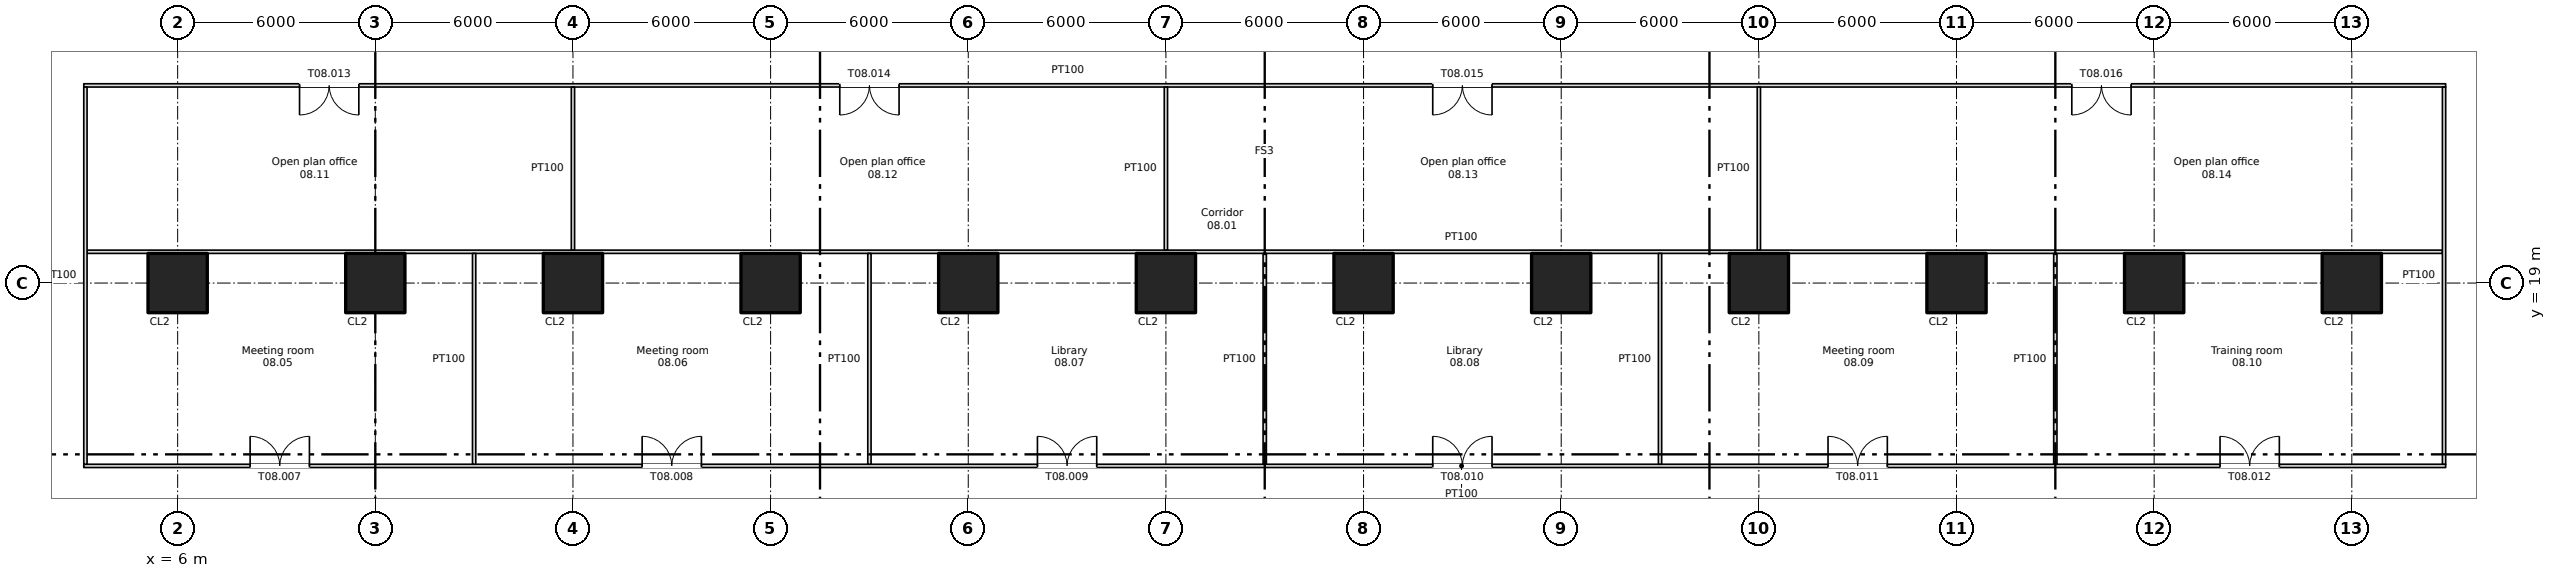
"""IFC4 building model, lengths in metres.
Left out: names, types, materials, properties, quantities, classifications, styles, units other than length and angle.
Written with IfcOpenShell. Run it as: python <this file> out.ifc"""

import sys

from ifc_helpers import new_model, si_unit, direction, frame, frame_2d, origin, origin_2d, place, context, subcontext, project, spatial, rectangle, extrude, element, fill, save


model = new_model("IFC4")
c1 = context("Model", 3, precision=1e-05, world=origin(), true_north=direction((0.0, 1.0)))
c2 = subcontext(c1, "Body", "Model", "MODEL_VIEW")
j1 = project(units=[si_unit("LENGTHUNIT", "METRE"), si_unit("PLANEANGLEUNIT", "RADIAN")], contexts=[c1])
p1 = place(None, origin())
s1 = spatial("IfcSite", under=j1, at=p1, CompositionType="ELEMENT")
p2 = place(p1, origin())
s2 = spatial("IfcBuilding", under=s1, at=p2, CompositionType="ELEMENT")
p3 = place(p2, frame((0.0, 0.0, 30.0)))
s3 = spatial("IfcBuildingStorey", under=s2, at=p3, CompositionType="ELEMENT", Elevation=30.0)
for number, where, z_axis, x_axis in (
    (1, (6.0, 19.0, 0.0), (0.0, 0.0, 1.0), (1.0, 0.0, 0.0)),
    (2, (12.0, 19.0, 0.0), (0.0, 0.0, 1.0), (1.0, 0.0, 0.0)),
    (3, (18.0, 19.0, 0.0), (0.0, 0.0, 1.0), (1.0, 0.0, 0.0)),
    (4, (24.0, 19.0, 0.0), (0.0, 0.0, 1.0), (1.0, 0.0, 0.0)),
    (5, (30.0, 19.0, 0.0), (0.0, 0.0, 1.0), (1.0, 0.0, 0.0)),
    (6, (36.0, 19.0, 0.0), (0.0, 0.0, 1.0), (1.0, 0.0, 0.0)),
    (7, (42.0, 19.0, 0.0), (0.0, 0.0, 1.0), (1.0, 0.0, 0.0)),
    (8, (48.0, 19.0, 0.0), (0.0, 0.0, 1.0), (1.0, 0.0, 0.0)),
    (9, (54.0, 19.0, 0.0), (0.0, 0.0, 1.0), (1.0, 0.0, 0.0)),
    (10, (60.0, 19.0, 0.0), (0.0, 0.0, 1.0), (1.0, 0.0, 0.0)),
    (11, (66.0, 19.0, 0.0), (0.0, 0.0, 1.0), (1.0, 0.0, 0.0)),
    (12, (72.0, 19.0, 0.0), (0.0, 0.0, 1.0), (1.0, 0.0, 0.0)),
):
    element("IfcColumn", number, at=place(p3, frame(where, z_axis=z_axis, x_axis=x_axis)), inside=s3, PredefinedType="COLUMN", context=c2, shape_type="SweptSolid", body=[
        extrude(rectangle(XDim=1.8, YDim=1.8, at=origin_2d()), origin(), (0.0, 0.0, 1.0), 3.35),
    ])
p4 = place(p3, frame((3.15, 13.45, 0.0), z_axis=(0.0, 0.0, 1.0), x_axis=(1.0, 0.0, 0.0)))
e13 = element("IfcWall", 13, at=p4, inside=s3, PredefinedType="PARTITIONING", context=c2, shape_type="SweptSolid", body=[
    extrude(rectangle(XDim=71.7, YDim=0.1, at=frame_2d((35.85, 0.0))), origin(), (0.0, 0.0, 1.0), 3.35),
])
p5 = place(p4, frame((5.05, 0.0, 0.0)))
e14 = element("IfcOpeningElement", 14, at=p5, cuts=e13, PredefinedType="OPENING", context=c2, shape_type="SweptSolid", body=[
    extrude(rectangle(XDim=1.8, YDim=2.1, at=frame_2d((0.9, 1.05))), frame((0.0, 0.06, 0.0), z_axis=(0.0, -1.0, 0.0), x_axis=(1.0, 0.0, 0.0)), (0.0, 0.0, 1.0), 0.12),
])
p6 = place(p4, frame((16.95, 0.0, 0.0)))
e15 = element("IfcOpeningElement", 15, at=p6, cuts=e13, PredefinedType="OPENING", context=c2, shape_type="SweptSolid", body=[
    extrude(rectangle(XDim=1.8, YDim=2.1, at=frame_2d((0.9, 1.05))), frame((0.0, 0.06, 0.0), z_axis=(0.0, -1.0, 0.0), x_axis=(1.0, 0.0, 0.0)), (0.0, 0.0, 1.0), 0.12),
])
p7 = place(p4, frame((28.95, 0.0, 0.0)))
e16 = element("IfcOpeningElement", 16, at=p7, cuts=e13, PredefinedType="OPENING", context=c2, shape_type="SweptSolid", body=[
    extrude(rectangle(XDim=1.8, YDim=2.1, at=frame_2d((0.9, 1.05))), frame((0.0, 0.06, 0.0), z_axis=(0.0, -1.0, 0.0), x_axis=(1.0, 0.0, 0.0)), (0.0, 0.0, 1.0), 0.12),
])
p8 = place(p4, frame((40.95, 0.0, 0.0)))
e17 = element("IfcOpeningElement", 17, at=p8, cuts=e13, PredefinedType="OPENING", context=c2, shape_type="SweptSolid", body=[
    extrude(rectangle(XDim=1.8, YDim=2.1, at=frame_2d((0.9, 1.05))), frame((0.0, 0.06, 0.0), z_axis=(0.0, -1.0, 0.0), x_axis=(1.0, 0.0, 0.0)), (0.0, 0.0, 1.0), 0.12),
])
p9 = place(p4, frame((52.95, 0.0, 0.0)))
e18 = element("IfcOpeningElement", 18, at=p9, cuts=e13, PredefinedType="OPENING", context=c2, shape_type="SweptSolid", body=[
    extrude(rectangle(XDim=1.8, YDim=2.1, at=frame_2d((0.9, 1.05))), frame((0.0, 0.06, 0.0), z_axis=(0.0, -1.0, 0.0), x_axis=(1.0, 0.0, 0.0)), (0.0, 0.0, 1.0), 0.12),
])
p10 = place(p4, frame((64.85, 0.0, 0.0)))
e19 = element("IfcOpeningElement", 19, at=p10, cuts=e13, PredefinedType="OPENING", context=c2, shape_type="SweptSolid", body=[
    extrude(rectangle(XDim=1.8, YDim=2.1, at=frame_2d((0.9, 1.05))), frame((0.0, 0.06, 0.0), z_axis=(0.0, -1.0, 0.0), x_axis=(1.0, 0.0, 0.0)), (0.0, 0.0, 1.0), 0.12),
])
p11 = place(p3, frame((3.25, 19.95, 0.0), z_axis=(0.0, 0.0, 1.0), x_axis=(1.0, 0.0, 0.0)))
e20 = element("IfcWall", 20, at=p11, inside=s3, PredefinedType="PARTITIONING", context=c2, shape_type="SweptSolid", body=[
    extrude(rectangle(XDim=71.5, YDim=0.1, at=frame_2d((35.75, 0.0))), origin(), (0.0, 0.0, 1.0), 3.35),
])
p12 = place(p3, frame((3.15, 25.0, 0.0), z_axis=(0.0, 0.0, 1.0), x_axis=(1.0, 0.0, 0.0)))
e21 = element("IfcWall", 21, at=p12, inside=s3, PredefinedType="PARTITIONING", context=c2, shape_type="SweptSolid", body=[
    extrude(rectangle(XDim=71.7, YDim=0.1, at=frame_2d((35.85, 0.0))), origin(), (0.0, 0.0, 1.0), 3.35),
])
p13 = place(p12, frame((6.55, 0.0, 0.0)))
e22 = element("IfcOpeningElement", 22, at=p13, cuts=e21, PredefinedType="OPENING", context=c2, shape_type="SweptSolid", body=[
    extrude(rectangle(XDim=1.8, YDim=2.1, at=frame_2d((0.9, 1.05))), frame((0.0, 0.06, 0.0), z_axis=(0.0, -1.0, 0.0), x_axis=(1.0, 0.0, 0.0)), (0.0, 0.0, 1.0), 0.12),
])
p14 = place(p12, frame((22.95, 0.0, 0.0)))
e23 = element("IfcOpeningElement", 23, at=p14, cuts=e21, PredefinedType="OPENING", context=c2, shape_type="SweptSolid", body=[
    extrude(rectangle(XDim=1.8, YDim=2.1, at=frame_2d((0.9, 1.05))), frame((0.0, 0.06, 0.0), z_axis=(0.0, -1.0, 0.0), x_axis=(1.0, 0.0, 0.0)), (0.0, 0.0, 1.0), 0.12),
])
p15 = place(p12, frame((40.95, 0.0, 0.0)))
e24 = element("IfcOpeningElement", 24, at=p15, cuts=e21, PredefinedType="OPENING", context=c2, shape_type="SweptSolid", body=[
    extrude(rectangle(XDim=1.8, YDim=2.1, at=frame_2d((0.9, 1.05))), frame((0.0, 0.06, 0.0), z_axis=(0.0, -1.0, 0.0), x_axis=(1.0, 0.0, 0.0)), (0.0, 0.0, 1.0), 0.12),
])
p16 = place(p12, frame((60.35, 0.0, 0.0)))
e25 = element("IfcOpeningElement", 25, at=p16, cuts=e21, PredefinedType="OPENING", context=c2, shape_type="SweptSolid", body=[
    extrude(rectangle(XDim=1.8, YDim=2.1, at=frame_2d((0.9, 1.05))), frame((0.0, 0.06, 0.0), z_axis=(0.0, -1.0, 0.0), x_axis=(1.0, 0.0, 0.0)), (0.0, 0.0, 1.0), 0.12),
])
p17 = place(p3, frame((3.2, 13.5, 0.0), z_axis=(0.0, 0.0, 1.0), x_axis=(0.0, 1.0, 0.0)))
e26 = element("IfcWall", 26, at=p17, inside=s3, PredefinedType="PARTITIONING", context=c2, shape_type="SweptSolid", body=[
    extrude(rectangle(XDim=11.45, YDim=0.1, at=frame_2d((5.725, 0.0))), origin(), (0.0, 0.0, 1.0), 3.35),
])
p18 = place(p3, frame((15.0, 13.5, 0.0), z_axis=(0.0, 0.0, 1.0), x_axis=(0.0, 1.0, 0.0)))
e27 = element("IfcWall", 27, at=p18, inside=s3, PredefinedType="PARTITIONING", context=c2, shape_type="SweptSolid", body=[
    extrude(rectangle(XDim=6.4, YDim=0.1, at=frame_2d((3.2, 0.0))), origin(), (0.0, 0.0, 1.0), 3.35),
])
p19 = place(p3, frame((18.0, 20.0, 0.0), z_axis=(0.0, 0.0, 1.0), x_axis=(0.0, 1.0, 0.0)))
e28 = element("IfcWall", 28, at=p19, inside=s3, PredefinedType="PARTITIONING", context=c2, shape_type="SweptSolid", body=[
    extrude(rectangle(XDim=4.95, YDim=0.1, at=frame_2d((2.475, 0.0))), origin(), (0.0, 0.0, 1.0), 3.35),
])
p20 = place(p3, frame((27.0, 13.5, 0.0), z_axis=(0.0, 0.0, 1.0), x_axis=(0.0, 1.0, 0.0)))
e29 = element("IfcWall", 29, at=p20, inside=s3, PredefinedType="PARTITIONING", context=c2, shape_type="SweptSolid", body=[
    extrude(rectangle(XDim=6.4, YDim=0.1, at=frame_2d((3.2, 0.0))), origin(), (0.0, 0.0, 1.0), 3.35),
])
p21 = place(p3, frame((36.0, 20.0, 0.0), z_axis=(0.0, 0.0, 1.0), x_axis=(0.0, 1.0, 0.0)))
e30 = element("IfcWall", 30, at=p21, inside=s3, PredefinedType="PARTITIONING", context=c2, shape_type="SweptSolid", body=[
    extrude(rectangle(XDim=4.95, YDim=0.1, at=frame_2d((2.475, 0.0))), origin(), (0.0, 0.0, 1.0), 3.35),
])
for number, where, z_axis, x_axis in (
    (31, (39.0, 13.5, 0.0), (0.0, 0.0, 1.0), (0.0, 1.0, 0.0)),
    (32, (51.0, 13.5, 0.0), (0.0, 0.0, 1.0), (0.0, 1.0, 0.0)),
):
    element("IfcWall", number, at=place(p3, frame(where, z_axis=z_axis, x_axis=x_axis)), inside=s3, PredefinedType="PARTITIONING", context=c2, shape_type="SweptSolid", body=[
        extrude(rectangle(XDim=6.4, YDim=0.1, at=frame_2d((3.2, 0.0))), origin(), (0.0, 0.0, 1.0), 3.35),
    ])
p22 = place(p3, frame((54.0, 20.0, 0.0), z_axis=(0.0, 0.0, 1.0), x_axis=(0.0, 1.0, 0.0)))
e33 = element("IfcWall", 33, at=p22, inside=s3, PredefinedType="PARTITIONING", context=c2, shape_type="SweptSolid", body=[
    extrude(rectangle(XDim=4.95, YDim=0.1, at=frame_2d((2.475, 0.0))), origin(), (0.0, 0.0, 1.0), 3.35),
])
p23 = place(p3, frame((63.0, 13.5, 0.0), z_axis=(0.0, 0.0, 1.0), x_axis=(0.0, 1.0, 0.0)))
e34 = element("IfcWall", 34, at=p23, inside=s3, PredefinedType="PARTITIONING", context=c2, shape_type="SweptSolid", body=[
    extrude(rectangle(XDim=6.4, YDim=0.1, at=frame_2d((3.2, 0.0))), origin(), (0.0, 0.0, 1.0), 3.35),
])
p24 = place(p3, frame((74.8, 13.5, 0.0), z_axis=(0.0, 0.0, 1.0), x_axis=(0.0, 1.0, 0.0)))
e35 = element("IfcWall", 35, at=p24, inside=s3, PredefinedType="PARTITIONING", context=c2, shape_type="SweptSolid", body=[
    extrude(rectangle(XDim=11.45, YDim=0.1, at=frame_2d((5.725, 0.0))), origin(), (0.0, 0.0, 1.0), 3.35),
])
p25 = place(p5, origin())
e36 = element("IfcDoor", 36, at=p25, inside=s3, OperationType="DOUBLE_DOOR_SINGLE_SWING", PredefinedType="DOOR", context=c2, shape_type="SweptSolid", body=[
    extrude(rectangle(XDim=1.8, YDim=2.1, at=frame_2d((0.9, 1.05))), frame((0.0, 0.025, 0.0), z_axis=(0.0, -1.0, 0.0), x_axis=(1.0, 0.0, 0.0)), (0.0, 0.0, 1.0), 0.05),
])
fill(e14, e36)
p26 = place(p6, origin())
e37 = element("IfcDoor", 37, at=p26, inside=s3, OperationType="DOUBLE_DOOR_SINGLE_SWING", PredefinedType="DOOR", context=c2, shape_type="SweptSolid", body=[
    extrude(rectangle(XDim=1.8, YDim=2.1, at=frame_2d((0.9, 1.05))), frame((0.0, 0.025, 0.0), z_axis=(0.0, -1.0, 0.0), x_axis=(1.0, 0.0, 0.0)), (0.0, 0.0, 1.0), 0.05),
])
fill(e15, e37)
p27 = place(p7, origin())
e38 = element("IfcDoor", 38, at=p27, inside=s3, OperationType="DOUBLE_DOOR_SINGLE_SWING", PredefinedType="DOOR", context=c2, shape_type="SweptSolid", body=[
    extrude(rectangle(XDim=1.8, YDim=2.1, at=frame_2d((0.9, 1.05))), frame((0.0, 0.025, 0.0), z_axis=(0.0, -1.0, 0.0), x_axis=(1.0, 0.0, 0.0)), (0.0, 0.0, 1.0), 0.05),
])
fill(e16, e38)
p28 = place(p8, origin())
e39 = element("IfcDoor", 39, at=p28, inside=s3, OperationType="DOUBLE_DOOR_SINGLE_SWING", PredefinedType="DOOR", context=c2, shape_type="SweptSolid", body=[
    extrude(rectangle(XDim=1.8, YDim=2.1, at=frame_2d((0.9, 1.05))), frame((0.0, 0.025, 0.0), z_axis=(0.0, -1.0, 0.0), x_axis=(1.0, 0.0, 0.0)), (0.0, 0.0, 1.0), 0.05),
])
fill(e17, e39)
p29 = place(p9, origin())
e40 = element("IfcDoor", 40, at=p29, inside=s3, OperationType="DOUBLE_DOOR_SINGLE_SWING", PredefinedType="DOOR", context=c2, shape_type="SweptSolid", body=[
    extrude(rectangle(XDim=1.8, YDim=2.1, at=frame_2d((0.9, 1.05))), frame((0.0, 0.025, 0.0), z_axis=(0.0, -1.0, 0.0), x_axis=(1.0, 0.0, 0.0)), (0.0, 0.0, 1.0), 0.05),
])
fill(e18, e40)
p30 = place(p10, origin())
e41 = element("IfcDoor", 41, at=p30, inside=s3, OperationType="DOUBLE_DOOR_SINGLE_SWING", PredefinedType="DOOR", context=c2, shape_type="SweptSolid", body=[
    extrude(rectangle(XDim=1.8, YDim=2.1, at=frame_2d((0.9, 1.05))), frame((0.0, 0.025, 0.0), z_axis=(0.0, -1.0, 0.0), x_axis=(1.0, 0.0, 0.0)), (0.0, 0.0, 1.0), 0.05),
])
fill(e19, e41)
p31 = place(p13, origin())
e42 = element("IfcDoor", 42, at=p31, inside=s3, OperationType="DOUBLE_DOOR_SINGLE_SWING", PredefinedType="DOOR", context=c2, shape_type="SweptSolid", body=[
    extrude(rectangle(XDim=1.8, YDim=2.1, at=frame_2d((0.9, 1.05))), frame((0.0, 0.025, 0.0), z_axis=(0.0, -1.0, 0.0), x_axis=(1.0, 0.0, 0.0)), (0.0, 0.0, 1.0), 0.05),
])
fill(e22, e42)
p32 = place(p14, origin())
e43 = element("IfcDoor", 43, at=p32, inside=s3, OperationType="DOUBLE_DOOR_SINGLE_SWING", PredefinedType="DOOR", context=c2, shape_type="SweptSolid", body=[
    extrude(rectangle(XDim=1.8, YDim=2.1, at=frame_2d((0.9, 1.05))), frame((0.0, 0.025, 0.0), z_axis=(0.0, -1.0, 0.0), x_axis=(1.0, 0.0, 0.0)), (0.0, 0.0, 1.0), 0.05),
])
fill(e23, e43)
p33 = place(p15, origin())
e44 = element("IfcDoor", 44, at=p33, inside=s3, OperationType="DOUBLE_DOOR_SINGLE_SWING", PredefinedType="DOOR", context=c2, shape_type="SweptSolid", body=[
    extrude(rectangle(XDim=1.8, YDim=2.1, at=frame_2d((0.9, 1.05))), frame((0.0, 0.025, 0.0), z_axis=(0.0, -1.0, 0.0), x_axis=(1.0, 0.0, 0.0)), (0.0, 0.0, 1.0), 0.05),
])
fill(e24, e44)
p34 = place(p16, origin())
e45 = element("IfcDoor", 45, at=p34, inside=s3, OperationType="DOUBLE_DOOR_SINGLE_SWING", PredefinedType="DOOR", context=c2, shape_type="SweptSolid", body=[
    extrude(rectangle(XDim=1.8, YDim=2.1, at=frame_2d((0.9, 1.05))), frame((0.0, 0.025, 0.0), z_axis=(0.0, -1.0, 0.0), x_axis=(1.0, 0.0, 0.0)), (0.0, 0.0, 1.0), 0.05),
])
fill(e25, e45)
save(model, sys.argv[1])
